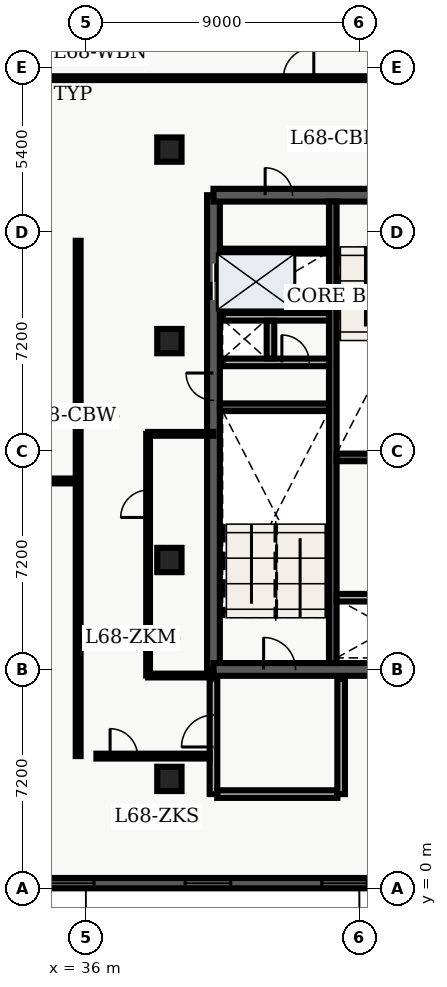
"""IFC4 building model, lengths in metres.
Left out: names, types, materials, properties, quantities, classifications, styles, units other than length and angle.
Written with IfcOpenShell. Run it as: python <this file> out.ifc"""

import sys

from ifc_helpers import new_model, entity, si_unit, converted_unit, direction, frame, origin_with_axes, origin_2d_with_axis, place, context, subcontext, project, spatial, polyline, rectangle, outline, extrude, element, fill, save


model = new_model("IFC4")
c1 = context("Model", 3, precision=1e-05, world=origin_with_axes(), true_north=direction((0.0, 1.0)))
c2 = subcontext(c1, "Body", "Model", "MODEL_VIEW")
j1 = project(units=[si_unit("LENGTHUNIT", "METRE"), converted_unit("PLANEANGLEUNIT", "DEGREE", entity("IfcPlaneAngleMeasure", 0.017), si_unit("PLANEANGLEUNIT", "RADIAN"), dimensions=[0, 0, 0, 0, 0, 0, 0])], contexts=[c1])
p1 = place(None, origin_with_axes())
s1 = spatial("IfcSite", under=j1, at=p1, CompositionType="ELEMENT")
p2 = place(p1, origin_with_axes())
s2 = spatial("IfcBuilding", under=s1, at=p2, CompositionType="ELEMENT")
p3 = place(p2, frame((0.0, 0.0, 276.3), z_axis=(0.0, 0.0, 1.0), x_axis=(1.0, 0.0, 0.0)))
s3 = spatial("IfcBuildingStorey", under=s2, at=p3, CompositionType="ELEMENT", Elevation=276.3)
p4 = place(p3, frame((40.2, 7.2, 0.0), z_axis=(0.0, 0.0, 1.0), x_axis=(0.0, 1.0, 0.0)))
e1 = element("IfcWall", 1, at=p4, inside=s3, PredefinedType="SHEAR", context=c2, shape_type="SweptSolid", body=[
    extrude(outline(polyline([(0.0, -0.21), (15.6, -0.21), (15.6, 0.21), (0.0, 0.21), (0.0, -0.21)])), origin_with_axes(), (0.0, 0.0, 1.0), 3.66),
])
p5 = place(p4, frame((12.75, 0.0, 0.0), z_axis=(0.0, 0.0, 1.0), x_axis=(1.0, 0.0, 0.0)))
e2 = element("IfcOpeningElement", 2, at=p5, cuts=e1, PredefinedType="OPENING", context=c2, shape_type="SweptSolid", body=[
    extrude(rectangle(XDim=1.2, YDim=0.44, at=origin_2d_with_axis()), origin_with_axes(), (0.0, 0.0, 1.0), 2.15),
])
p6 = place(p4, frame((9.3, 0.0, 0.0), z_axis=(0.0, 0.0, 1.0), x_axis=(1.0, 0.0, 0.0)))
e3 = element("IfcOpeningElement", 3, at=p6, cuts=e1, PredefinedType="OPENING", context=c2, shape_type="SweptSolid", body=[
    extrude(rectangle(XDim=0.9, YDim=0.44, at=origin_2d_with_axis()), origin_with_axes(), (0.0, 0.0, 1.0), 2.15),
])
p7 = place(p3, frame((40.2, 7.2, 0.0), z_axis=(0.0, 0.0, 1.0), x_axis=(1.0, 0.0, 0.0)))
e4 = element("IfcWall", 4, at=p7, inside=s3, PredefinedType="SHEAR", context=c2, shape_type="SweptSolid", body=[
    extrude(outline(polyline([(0.0, -0.21), (7.85, -0.21), (7.85, 0.21), (0.0, 0.21), (0.0, -0.21)])), origin_with_axes(), (0.0, 0.0, 1.0), 3.66),
])
p8 = place(p7, frame((2.175, 0.0, 0.0), z_axis=(0.0, 0.0, 1.0), x_axis=(1.0, 0.0, 0.0)))
e5 = element("IfcOpeningElement", 5, at=p8, cuts=e4, PredefinedType="OPENING", context=c2, shape_type="SweptSolid", body=[
    extrude(rectangle(XDim=1.05, YDim=0.44, at=origin_2d_with_axis()), origin_with_axes(), (0.0, 0.0, 1.0), 2.15),
])
p9 = place(p3, frame((40.2, 22.8, 0.0), z_axis=(0.0, 0.0, 1.0), x_axis=(1.0, 0.0, 0.0)))
e6 = element("IfcWall", 6, at=p9, inside=s3, PredefinedType="SHEAR", context=c2, shape_type="SweptSolid", body=[
    extrude(outline(polyline([(0.0, -0.21), (7.85, -0.21), (7.85, 0.21), (0.0, 0.21), (0.0, -0.21)])), origin_with_axes(), (0.0, 0.0, 1.0), 3.66),
])
p10 = place(p9, frame((5.775, 0.0, 0.0), z_axis=(0.0, 0.0, 1.0), x_axis=(1.0, 0.0, 0.0)))
e7 = element("IfcOpeningElement", 7, at=p10, cuts=e6, PredefinedType="OPENING", context=c2, shape_type="SweptSolid", body=[
    extrude(rectangle(XDim=1.05, YDim=0.44, at=origin_2d_with_axis()), origin_with_axes(), (0.0, 0.0, 1.0), 2.15),
])
p11 = place(p9, frame((2.15, 0.0, 0.0), z_axis=(0.0, 0.0, 1.0), x_axis=(1.0, 0.0, 0.0)))
e8 = element("IfcOpeningElement", 8, at=p11, cuts=e6, PredefinedType="OPENING", context=c2, shape_type="SweptSolid", body=[
    extrude(rectangle(XDim=0.9, YDim=0.44, at=origin_2d_with_axis()), origin_with_axes(), (0.0, 0.0, 1.0), 2.15),
])
p12 = place(p3, frame((44.125, 7.41, 0.0), z_axis=(0.0, 0.0, 1.0), x_axis=(0.0, 1.0, 0.0)))
e9 = element("IfcWall", 9, at=p12, inside=s3, PredefinedType="SHEAR", context=c2, shape_type="SweptSolid", body=[
    extrude(outline(polyline([(0.0, -0.125), (15.18, -0.125), (15.18, 0.125), (0.0, 0.125), (0.0, -0.125)])), origin_with_axes(), (0.0, 0.0, 1.0), 3.66),
])
for number, where, z_axis, x_axis in (
    (10, (40.41, 15.825, 0.0), (0.0, 0.0, 1.0), (1.0, 0.0, 0.0)),
    (11, (44.25, 14.175, 0.0), (0.0, 0.0, 1.0), (1.0, 0.0, 0.0)),
):
    element("IfcWall", number, at=place(p3, frame(where, z_axis=z_axis, x_axis=x_axis)), inside=s3, PredefinedType="SHEAR", context=c2, shape_type="SweptSolid", body=[
        extrude(outline(polyline([(0.0, -0.125), (3.59, -0.125), (3.59, 0.125), (0.0, 0.125), (0.0, -0.125)])), origin_with_axes(), (0.0, 0.0, 1.0), 3.66),
    ])
p13 = place(p3, frame((40.5, 17.3, 0.0), z_axis=(0.0, 0.0, 1.0), x_axis=(1.0, 0.0, 0.0)))
e12 = element("IfcWall", 12, at=p13, inside=s3, PredefinedType="SOLIDWALL", context=c2, shape_type="SweptSolid", body=[
    extrude(outline(polyline([(0.0, -0.125), (3.5, -0.125), (3.5, 0.125), (0.0, 0.125), (0.0, -0.125)])), origin_with_axes(), (0.0, 0.0, 1.0), 2.7),
])
p14 = place(p13, frame((2.4, 0.0, 0.0), z_axis=(0.0, 0.0, 1.0), x_axis=(1.0, 0.0, 0.0)))
e13 = element("IfcOpeningElement", 13, at=p14, cuts=e12, PredefinedType="OPENING", context=c2, shape_type="SweptSolid", body=[
    extrude(rectangle(XDim=0.9, YDim=0.27, at=origin_2d_with_axis()), origin_with_axes(), (0.0, 0.0, 1.0), 2.15),
])
p15 = place(p3, frame((40.5, 18.8, 0.0), z_axis=(0.0, 0.0, 1.0), x_axis=(1.0, 0.0, 0.0)))
e14 = element("IfcWall", 14, at=p15, inside=s3, PredefinedType="SOLIDWALL", context=c2, shape_type="SweptSolid", body=[
    extrude(outline(polyline([(0.0, -0.125), (3.5, -0.125), (3.5, 0.125), (0.0, 0.125), (0.0, -0.125)])), origin_with_axes(), (0.0, 0.0, 1.0), 2.7),
])
p16 = place(p3, frame((42.075, 17.43, 0.0), z_axis=(0.0, 0.0, 1.0), x_axis=(0.0, 1.0, 0.0)))
e15 = element("IfcWall", 15, at=p16, inside=s3, PredefinedType="SOLIDWALL", context=c2, shape_type="SweptSolid", body=[
    extrude(outline(polyline([(0.0, -0.125), (1.24, -0.125), (1.24, 0.125), (0.0, 0.125), (0.0, -0.125)])), origin_with_axes(), (0.0, 0.0, 1.0), 2.7),
])
p17 = place(p3, frame((40.2, 3.1, 0.0), z_axis=(0.0, 0.0, 1.0), x_axis=(0.0, 1.0, 0.0)))
e16 = element("IfcWall", 16, at=p17, inside=s3, PredefinedType="SOLIDWALL", context=c2, shape_type="SweptSolid", body=[
    extrude(outline(polyline([(0.0, -0.125), (3.8, -0.125), (3.8, 0.125), (0.0, 0.125), (0.0, -0.125)])), origin_with_axes(), (0.0, 0.0, 1.0), 2.7),
])
p18 = place(p17, frame((2.075, 0.0, 0.0), z_axis=(0.0, 0.0, 1.0), x_axis=(1.0, 0.0, 0.0)))
e17 = element("IfcOpeningElement", 17, at=p18, cuts=e16, PredefinedType="OPENING", context=c2, shape_type="SweptSolid", body=[
    extrude(rectangle(XDim=1.05, YDim=0.27, at=origin_2d_with_axis()), origin_with_axes(), (0.0, 0.0, 1.0), 2.15),
])
p19 = place(p3, frame((40.325, 3.1, 0.0), z_axis=(0.0, 0.0, 1.0), x_axis=(1.0, 0.0, 0.0)))
e18 = element("IfcWall", 18, at=p19, inside=s3, PredefinedType="SOLIDWALL", context=c2, shape_type="SweptSolid", body=[
    extrude(outline(polyline([(0.0, -0.125), (3.95, -0.125), (3.95, 0.125), (0.0, 0.125), (0.0, -0.125)])), origin_with_axes(), (0.0, 0.0, 1.0), 2.7),
])
p20 = place(p3, frame((44.4, 3.1, 0.0), z_axis=(0.0, 0.0, 1.0), x_axis=(0.0, 1.0, 0.0)))
e19 = element("IfcWall", 19, at=p20, inside=s3, PredefinedType="SOLIDWALL", context=c2, shape_type="SweptSolid", body=[
    extrude(outline(polyline([(0.0, -0.125), (3.8, -0.125), (3.8, 0.125), (0.0, 0.125), (0.0, -0.125)])), origin_with_axes(), (0.0, 0.0, 1.0), 2.7),
])
for number, where, z_axis, x_axis in (
    (20, (38.75, 3.6, 0.0), (0.0, 0.0, 1.0), (1.0, 0.0, 0.0)),
    (21, (38.75, 10.8, 0.0), (0.0, 0.0, 1.0), (1.0, 0.0, 0.0)),
    (22, (38.75, 18.0, 0.0), (0.0, 0.0, 1.0), (1.0, 0.0, 0.0)),
    (23, (38.75, 24.3, 0.0), (0.0, 0.0, 1.0), (1.0, 0.0, 0.0)),
):
    element("IfcColumn", number, at=place(p3, frame(where, z_axis=z_axis, x_axis=x_axis)), inside=s3, PredefinedType="COLUMN", context=c2, shape_type="SweptSolid", body=[
        extrude(rectangle(XDim=0.8, YDim=0.8, at=origin_2d_with_axis()), origin_with_axes(), (0.0, 0.0, 1.0), 3.9),
    ])
p21 = place(p3, frame((40.5, 20.96, 0.0), z_axis=(0.0, 0.0, 1.0), x_axis=(1.0, 0.0, 0.0)))
e24 = element("IfcWall", 24, at=p21, inside=s3, PredefinedType="PARTITIONING", context=c2, shape_type="SweptSolid", body=[
    extrude(outline(polyline([(0.0, -0.08), (3.5, -0.08), (3.5, 0.08), (0.0, 0.08), (0.0, -0.08)])), origin_with_axes(), (0.0, 0.0, 1.0), 2.7),
])
p22 = place(p3, frame((44.25, 9.56, 0.0), z_axis=(0.0, 0.0, 1.0), x_axis=(1.0, 0.0, 0.0)))
e25 = element("IfcWall", 25, at=p22, inside=s3, PredefinedType="SOLIDWALL", context=c2, shape_type="SweptSolid", body=[
    extrude(outline(polyline([(0.0, -0.125), (3.5, -0.125), (3.5, 0.125), (0.0, 0.125), (0.0, -0.125)])), origin_with_axes(), (0.0, 0.0, 1.0), 2.7),
])
p23 = place(p3, frame((20.3, 13.4, 0.0), z_axis=(0.0, 0.0, 1.0), x_axis=(1.0, 0.0, 0.0)))
e26 = element("IfcWall", 26, at=p23, inside=s3, PredefinedType="PARTITIONING", context=c2, shape_type="SweptSolid", body=[
    extrude(outline(polyline([(0.0, -0.08), (15.45, -0.08), (15.45, 0.08), (0.0, 0.08), (0.0, -0.08)])), origin_with_axes(), (0.0, 0.0, 1.0), 2.7),
])
p24 = place(p23, frame((2.34, 0.0, 0.0), z_axis=(0.0, 0.0, 1.0), x_axis=(1.0, 0.0, 0.0)))
e27 = element("IfcOpeningElement", 27, at=p24, cuts=e26, PredefinedType="OPENING", context=c2, shape_type="SweptSolid", body=[
    extrude(rectangle(XDim=1.0, YDim=0.18, at=origin_2d_with_axis()), origin_with_axes(), (0.0, 0.0, 1.0), 2.15),
])
p25 = place(p23, frame((7.011, 0.0, 0.0), z_axis=(0.0, 0.0, 1.0), x_axis=(1.0, 0.0, 0.0)))
e28 = element("IfcOpeningElement", 28, at=p25, cuts=e26, PredefinedType="OPENING", context=c2, shape_type="SweptSolid", body=[
    extrude(rectangle(XDim=1.0, YDim=0.18, at=origin_2d_with_axis()), origin_with_axes(), (0.0, 0.0, 1.0), 2.15),
])
p26 = place(p23, frame((12.445, 0.0, 0.0), z_axis=(0.0, 0.0, 1.0), x_axis=(1.0, 0.0, 0.0)))
e29 = element("IfcOpeningElement", 29, at=p26, cuts=e26, PredefinedType="OPENING", context=c2, shape_type="SweptSolid", body=[
    extrude(rectangle(XDim=1.2, YDim=0.18, at=origin_2d_with_axis()), origin_with_axes(), (0.0, 0.0, 1.0), 2.2),
])
p27 = place(p3, frame((20.3, 15.7, 0.0), z_axis=(0.0, 0.0, 1.0), x_axis=(1.0, 0.0, 0.0)))
e30 = element("IfcWall", 30, at=p27, inside=s3, PredefinedType="PARTITIONING", context=c2, shape_type="SweptSolid", body=[
    extrude(outline(polyline([(0.0, -0.08), (15.45, -0.08), (15.45, 0.08), (0.0, 0.08), (0.0, -0.08)])), origin_with_axes(), (0.0, 0.0, 1.0), 2.7),
])
p28 = place(p27, frame((7.775, 0.0, 0.0), z_axis=(0.0, 0.0, 1.0), x_axis=(1.0, 0.0, 0.0)))
e31 = element("IfcOpeningElement", 31, at=p28, cuts=e30, PredefinedType="OPENING", context=c2, shape_type="SweptSolid", body=[
    extrude(rectangle(XDim=1.0, YDim=0.18, at=origin_2d_with_axis()), origin_with_axes(), (0.0, 0.0, 1.0), 2.15),
])
p29 = place(p3, frame((35.75, 4.35, 0.0), z_axis=(0.0, 0.0, 1.0), x_axis=(0.0, 1.0, 0.0)))
e32 = element("IfcWall", 32, at=p29, inside=s3, PredefinedType="PARTITIONING", context=c2, shape_type="SweptSolid", body=[
    extrude(outline(polyline([(0.0, -0.08), (16.95, -0.08), (16.95, 0.08), (0.0, 0.08), (0.0, -0.08)])), origin_with_axes(), (0.0, 0.0, 1.0), 2.7),
])
p30 = place(p3, frame((34.535, 26.65, 0.0), z_axis=(0.0, 0.0, 1.0), x_axis=(1.0, 0.0, 0.0)))
e33 = element("IfcWall", 33, at=p30, inside=s3, PredefinedType="PARTITIONING", context=c2, shape_type="SweptSolid", body=[
    extrude(outline(polyline([(0.0, -0.062), (12.995, -0.062), (12.995, 0.062), (0.0, 0.062), (0.0, -0.062)])), origin_with_axes(), (0.0, 0.0, 1.0), 2.7),
])
p31 = place(p30, frame((8.465, 0.0, 0.0), z_axis=(0.0, 0.0, 1.0), x_axis=(1.0, 0.0, 0.0)))
e34 = element("IfcOpeningElement", 34, at=p31, cuts=e33, PredefinedType="OPENING", context=c2, shape_type="SweptSolid", body=[
    extrude(rectangle(XDim=1.0, YDim=0.145, at=origin_2d_with_axis()), origin_with_axes(), (0.0, 0.0, 1.0), 2.15),
])
p32 = place(p3, frame((36.35, 4.35, 0.0), z_axis=(0.0, 0.0, 1.0), x_axis=(1.0, 0.0, 0.0)))
e35 = element("IfcWall", 35, at=p32, inside=s3, PredefinedType="PARTITIONING", context=c2, shape_type="SweptSolid", body=[
    extrude(outline(polyline([(0.0, -0.08), (3.725, -0.08), (3.725, 0.08), (0.0, 0.08), (0.0, -0.08)])), origin_with_axes(), (0.0, 0.0, 1.0), 2.7),
])
p33 = place(p32, frame((0.9, 0.0, 0.0), z_axis=(0.0, 0.0, 1.0), x_axis=(1.0, 0.0, 0.0)))
e36 = element("IfcOpeningElement", 36, at=p33, cuts=e35, PredefinedType="OPENING", context=c2, shape_type="SweptSolid", body=[
    extrude(rectangle(XDim=0.9, YDim=0.18, at=origin_2d_with_axis()), origin_with_axes(), (0.0, 0.0, 1.0), 2.15),
])
for number, where, z_axis, x_axis in (
    (37, (38.05, 7.0, 0.0), (0.0, 0.0, 1.0), (1.0, 0.0, 0.0)),
    (38, (38.05, 14.95, 0.0), (0.0, 0.0, 1.0), (1.0, 0.0, 0.0)),
):
    element("IfcWall", number, at=place(p3, frame(where, z_axis=z_axis, x_axis=x_axis)), inside=s3, PredefinedType="PARTITIONING", context=c2, shape_type="SweptSolid", body=[
        extrude(outline(polyline([(0.0, -0.062), (2.15, -0.062), (2.15, 0.062), (0.0, 0.062), (0.0, -0.062)])), origin_with_axes(), (0.0, 0.0, 1.0), 2.7),
    ])
p34 = place(p3, frame((38.05, 7.0, 0.0), z_axis=(0.0, 0.0, 1.0), x_axis=(0.0, 1.0, 0.0)))
e39 = element("IfcWall", 39, at=p34, inside=s3, PredefinedType="PARTITIONING", context=c2, shape_type="SweptSolid", body=[
    extrude(outline(polyline([(0.0, -0.062), (7.95, -0.062), (7.95, 0.062), (0.0, 0.062), (0.0, -0.062)])), origin_with_axes(), (0.0, 0.0, 1.0), 2.7),
])
p35 = place(p34, frame((5.65, 0.0, 0.0), z_axis=(0.0, 0.0, 1.0), x_axis=(1.0, 0.0, 0.0)))
e40 = element("IfcOpeningElement", 40, at=p35, cuts=e39, PredefinedType="OPENING", context=c2, shape_type="SweptSolid", body=[
    extrude(rectangle(XDim=0.9, YDim=0.145, at=origin_2d_with_axis()), origin_with_axes(), (0.0, 0.0, 1.0), 2.15),
])
p36 = place(p3, frame((47.36, 0.17, 0.0), z_axis=(0.0, 0.0, 1.0), x_axis=(-1.0, 0.0, 0.0)))
e41 = element("IfcWall", 41, at=p36, inside=s3, PredefinedType="SOLIDWALL", context=c2, shape_type="SweptSolid", body=[
    extrude(outline(polyline([(0.0, -0.17), (37.16, -0.17), (37.16, 0.17), (0.0, 0.17), (0.0, -0.17)])), origin_with_axes(), (0.0, 0.0, 1.0), 3.66),
])
p37 = place(p36, frame((2.847, 0.0, 0.45), z_axis=(0.0, 0.0, 1.0), x_axis=(1.0, 0.0, 0.0)))
e42 = element("IfcOpeningElement", 42, at=p37, cuts=e41, PredefinedType="OPENING", context=c2, shape_type="SweptSolid", body=[
    extrude(rectangle(XDim=1.5, YDim=0.36, at=origin_2d_with_axis()), origin_with_axes(), (0.0, 0.0, 1.0), 2.1),
])
p38 = place(p36, frame((7.342, 0.0, 0.45), z_axis=(0.0, 0.0, 1.0), x_axis=(1.0, 0.0, 0.0)))
e43 = element("IfcOpeningElement", 43, at=p38, cuts=e41, PredefinedType="OPENING", context=c2, shape_type="SweptSolid", body=[
    extrude(rectangle(XDim=1.5, YDim=0.36, at=origin_2d_with_axis()), origin_with_axes(), (0.0, 0.0, 1.0), 2.1),
])
p39 = place(p36, frame((11.837, 0.0, 0.45), z_axis=(0.0, 0.0, 1.0), x_axis=(1.0, 0.0, 0.0)))
e44 = element("IfcOpeningElement", 44, at=p39, cuts=e41, PredefinedType="OPENING", context=c2, shape_type="SweptSolid", body=[
    extrude(rectangle(XDim=1.5, YDim=0.36, at=origin_2d_with_axis()), origin_with_axes(), (0.0, 0.0, 1.0), 2.1),
])
p40 = place(p36, frame((15.882, 0.0, 0.45), z_axis=(0.0, 0.0, 1.0), x_axis=(1.0, 0.0, 0.0)))
e45 = element("IfcOpeningElement", 45, at=p40, cuts=e41, PredefinedType="OPENING", context=c2, shape_type="SweptSolid", body=[
    extrude(rectangle(XDim=1.5, YDim=0.36, at=origin_2d_with_axis()), origin_with_axes(), (0.0, 0.0, 1.0), 2.1),
])
p41 = place(p36, frame((20.827, 0.0, 0.45), z_axis=(0.0, 0.0, 1.0), x_axis=(1.0, 0.0, 0.0)))
e46 = element("IfcOpeningElement", 46, at=p41, cuts=e41, PredefinedType="OPENING", context=c2, shape_type="SweptSolid", body=[
    extrude(rectangle(XDim=1.5, YDim=0.36, at=origin_2d_with_axis()), origin_with_axes(), (0.0, 0.0, 1.0), 2.1),
])
p42 = place(p36, frame((25.322, 0.0, 0.45), z_axis=(0.0, 0.0, 1.0), x_axis=(1.0, 0.0, 0.0)))
e47 = element("IfcOpeningElement", 47, at=p42, cuts=e41, PredefinedType="OPENING", context=c2, shape_type="SweptSolid", body=[
    extrude(rectangle(XDim=1.5, YDim=0.36, at=origin_2d_with_axis()), origin_with_axes(), (0.0, 0.0, 1.0), 2.1),
])
p43 = place(p36, frame((29.817, 0.0, 0.45), z_axis=(0.0, 0.0, 1.0), x_axis=(1.0, 0.0, 0.0)))
e48 = element("IfcOpeningElement", 48, at=p43, cuts=e41, PredefinedType="OPENING", context=c2, shape_type="SweptSolid", body=[
    extrude(rectangle(XDim=1.5, YDim=0.36, at=origin_2d_with_axis()), origin_with_axes(), (0.0, 0.0, 1.0), 2.1),
])
p44 = place(p36, frame((34.312, 0.0, 0.45), z_axis=(0.0, 0.0, 1.0), x_axis=(1.0, 0.0, 0.0)))
e49 = element("IfcOpeningElement", 49, at=p44, cuts=e41, PredefinedType="OPENING", context=c2, shape_type="SweptSolid", body=[
    extrude(rectangle(XDim=1.5, YDim=0.36, at=origin_2d_with_axis()), origin_with_axes(), (0.0, 0.0, 1.0), 2.1),
])
p45 = place(p4, frame((12.75, 0.0, 0.0), z_axis=(0.0, 0.0, 1.0), x_axis=(1.0, 0.0, 0.0)))
e50 = element("IfcDoor", 50, at=p45, inside=s3, OperationType="DOUBLE_DOOR_SLIDING", PredefinedType="DOOR", context=c2, shape_type="SweptSolid", body=[
    extrude(rectangle(XDim=1.2, YDim=0.09, at=origin_2d_with_axis()), origin_with_axes(), (0.0, 0.0, 1.0), 2.15),
])
fill(e2, e50)
p46 = place(p4, frame((9.3, 0.0, 0.0), z_axis=(0.0, 0.0, 1.0), x_axis=(1.0, 0.0, 0.0)))
e51 = element("IfcDoor", 51, at=p46, inside=s3, OperationType="SINGLE_SWING_RIGHT", PredefinedType="DOOR", context=c2, shape_type="SweptSolid", body=[
    extrude(rectangle(XDim=0.9, YDim=0.09, at=origin_2d_with_axis()), origin_with_axes(), (0.0, 0.0, 1.0), 2.15),
])
fill(e3, e51)
p47 = place(p13, frame((2.4, 0.0, 0.0), z_axis=(0.0, 0.0, 1.0), x_axis=(1.0, 0.0, 0.0)))
e52 = element("IfcDoor", 52, at=p47, inside=s3, OperationType="SINGLE_SWING_LEFT", PredefinedType="DOOR", context=c2, shape_type="SweptSolid", body=[
    extrude(rectangle(XDim=0.9, YDim=0.09, at=origin_2d_with_axis()), origin_with_axes(), (0.0, 0.0, 1.0), 2.15),
])
fill(e13, e52)
p48 = place(p7, frame((2.175, 0.0, 0.0), z_axis=(0.0, 0.0, 1.0), x_axis=(1.0, 0.0, 0.0)))
e53 = element("IfcDoor", 53, at=p48, inside=s3, OperationType="SINGLE_SWING_LEFT", PredefinedType="DOOR", context=c2, shape_type="SweptSolid", body=[
    extrude(rectangle(XDim=1.05, YDim=0.09, at=origin_2d_with_axis()), origin_with_axes(), (0.0, 0.0, 1.0), 2.15),
])
fill(e5, e53)
p49 = place(p17, frame((2.075, 0.0, 0.0), z_axis=(0.0, 0.0, 1.0), x_axis=(1.0, 0.0, 0.0)))
e54 = element("IfcDoor", 54, at=p49, inside=s3, OperationType="SINGLE_SWING_LEFT", PredefinedType="DOOR", context=c2, shape_type="SweptSolid", body=[
    extrude(rectangle(XDim=1.05, YDim=0.09, at=origin_2d_with_axis()), origin_with_axes(), (0.0, 0.0, 1.0), 2.15),
])
fill(e17, e54)
p50 = place(p9, frame((2.15, 0.0, 0.0), z_axis=(0.0, 0.0, 1.0), x_axis=(1.0, 0.0, 0.0)))
e55 = element("IfcDoor", 55, at=p50, inside=s3, OperationType="SINGLE_SWING_LEFT", PredefinedType="DOOR", context=c2, shape_type="SweptSolid", body=[
    extrude(rectangle(XDim=0.9, YDim=0.09, at=origin_2d_with_axis()), origin_with_axes(), (0.0, 0.0, 1.0), 2.15),
])
fill(e8, e55)
p51 = place(p30, frame((8.465, 0.0, 0.0), z_axis=(0.0, 0.0, 1.0), x_axis=(1.0, 0.0, 0.0)))
e56 = element("IfcDoor", 56, at=p51, inside=s3, OperationType="SINGLE_SWING_RIGHT", PredefinedType="DOOR", context=c2, shape_type="SweptSolid", body=[
    extrude(rectangle(XDim=1.0, YDim=0.075, at=origin_2d_with_axis()), origin_with_axes(), (0.0, 0.0, 1.0), 2.15),
])
fill(e34, e56)
p52 = place(p32, frame((0.9, 0.0, 0.0), z_axis=(0.0, 0.0, 1.0), x_axis=(1.0, 0.0, 0.0)))
e57 = element("IfcDoor", 57, at=p52, inside=s3, OperationType="SINGLE_SWING_LEFT", PredefinedType="DOOR", context=c2, shape_type="SweptSolid", body=[
    extrude(rectangle(XDim=0.9, YDim=0.09, at=origin_2d_with_axis()), origin_with_axes(), (0.0, 0.0, 1.0), 2.15),
])
fill(e36, e57)
p53 = place(p34, frame((5.65, 0.0, 0.0), z_axis=(0.0, 0.0, 1.0), x_axis=(1.0, 0.0, 0.0)))
e58 = element("IfcDoor", 58, at=p53, inside=s3, OperationType="SINGLE_SWING_LEFT", PredefinedType="DOOR", context=c2, shape_type="SweptSolid", body=[
    extrude(rectangle(XDim=0.9, YDim=0.075, at=origin_2d_with_axis()), origin_with_axes(), (0.0, 0.0, 1.0), 2.15),
])
fill(e40, e58)
p54 = place(p36, frame((2.847, 0.0, 0.45), z_axis=(0.0, 0.0, 1.0), x_axis=(1.0, 0.0, 0.0)))
e59 = element("IfcWindow", 59, at=p54, inside=s3, PredefinedType="WINDOW", context=c2, shape_type="SweptSolid", body=[
    extrude(rectangle(XDim=1.5, YDim=0.09, at=origin_2d_with_axis()), origin_with_axes(), (0.0, 0.0, 1.0), 2.1),
])
fill(e42, e59)
p55 = place(p36, frame((7.342, 0.0, 0.45), z_axis=(0.0, 0.0, 1.0), x_axis=(1.0, 0.0, 0.0)))
e60 = element("IfcWindow", 60, at=p55, inside=s3, PredefinedType="WINDOW", context=c2, shape_type="SweptSolid", body=[
    extrude(rectangle(XDim=1.5, YDim=0.09, at=origin_2d_with_axis()), origin_with_axes(), (0.0, 0.0, 1.0), 2.1),
])
fill(e43, e60)
p56 = place(p36, frame((11.837, 0.0, 0.45), z_axis=(0.0, 0.0, 1.0), x_axis=(1.0, 0.0, 0.0)))
e61 = element("IfcWindow", 61, at=p56, inside=s3, PredefinedType="WINDOW", context=c2, shape_type="SweptSolid", body=[
    extrude(rectangle(XDim=1.5, YDim=0.09, at=origin_2d_with_axis()), origin_with_axes(), (0.0, 0.0, 1.0), 2.1),
])
fill(e44, e61)
save(model, sys.argv[1])
